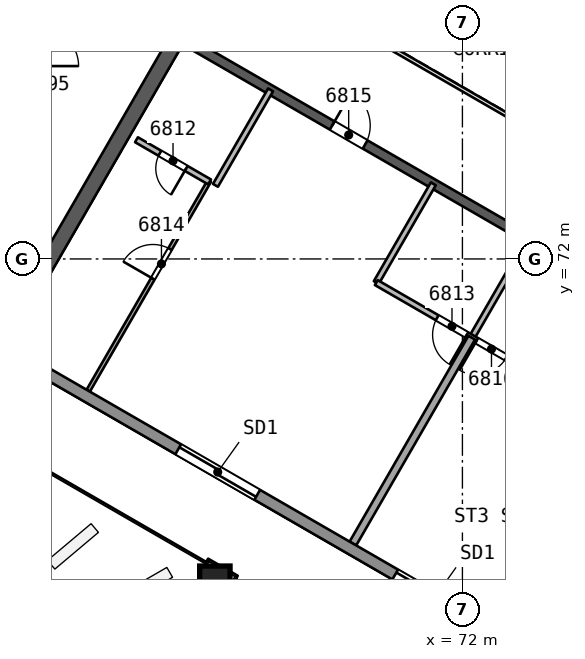
"""IFC4 building model, lengths in metres.
Left out: names, types, materials, properties, quantities, classifications, styles, units other than length and angle.
Written with IfcOpenShell. Run it as: python <this file> out.ifc"""

import sys

from ifc_helpers import new_model, si_unit, direction, frame, frame_2d, origin, origin_2d, place, context, subcontext, project, spatial, rectangle, extrude, element, fill, save


model = new_model("IFC4")
c1 = context("Model", 3, precision=1e-05, world=origin(), true_north=direction((0.0, 1.0)))
c2 = subcontext(c1, "Body", "Model", "MODEL_VIEW")
j1 = project(units=[si_unit("LENGTHUNIT", "METRE"), si_unit("PLANEANGLEUNIT", "RADIAN")], contexts=[c1])
p1 = place(None, origin())
s1 = spatial("IfcSite", under=j1, at=p1, CompositionType="ELEMENT")
p2 = place(p1, origin())
s2 = spatial("IfcBuilding", under=s1, at=p2, CompositionType="ELEMENT")
p3 = place(p2, frame((0.0, 0.0, 277.5)))
s3 = spatial("IfcBuildingStorey", under=s2, at=p3, CompositionType="ELEMENT", Elevation=277.5)
p4 = place(p3, frame((60.737, 71.284, 0.0), z_axis=(0.0, 0.0, 1.0), x_axis=(0.50000547566, 0.866022242388, 0.0)))
e1 = element("IfcWall", 1, at=p4, inside=s3, PredefinedType="SHEAR", context=c2, shape_type="SweptSolid", body=[
    extrude(rectangle(XDim=10.18, YDim=0.4, at=frame_2d((5.09, 0.0))), origin(), (0.0, 0.0, 1.0), 3.7),
])
p5 = place(p4, frame((8.03, 0.0, 0.0)))
e2 = element("IfcOpeningElement", 2, at=p5, cuts=e1, PredefinedType="OPENING", context=c2, shape_type="SweptSolid", body=[
    extrude(rectangle(XDim=1.2, YDim=2.1, at=frame_2d((0.6, 1.05))), frame((0.0, 0.21, 0.0), z_axis=(0.0, -1.0, 0.0), x_axis=(1.0, 0.0, 0.0)), (0.0, 0.0, 1.0), 0.421),
])
p6 = place(p3, frame((64.7, 77.748, 0.0), z_axis=(0.0, 0.0, 1.0), x_axis=(0.866026492143, -0.499998114903, 0.0)))
e3 = element("IfcWall", 3, at=p6, inside=s3, PredefinedType="SHEAR", context=c2, shape_type="SweptSolid", body=[
    extrude(rectangle(XDim=15.588, YDim=0.25, at=frame_2d((7.794, 0.0))), origin(), (0.0, 0.0, 1.0), 3.3),
])
p7 = place(p6, frame((4.473, 0.0, 0.0)))
e4 = element("IfcOpeningElement", 4, at=p7, cuts=e3, PredefinedType="OPENING", context=c2, shape_type="SweptSolid", body=[
    extrude(rectangle(XDim=1.0, YDim=2.1, at=frame_2d((0.5, 1.05))), frame((0.0, 0.135, 0.0), z_axis=(0.0, -1.0, 0.0), x_axis=(1.0, 0.0, 0.0)), (0.0, 0.0, 1.0), 0.271),
])
p8 = place(p6, frame((13.917, 0.0, 0.0)))
e5 = element("IfcOpeningElement", 5, at=p8, cuts=e3, PredefinedType="OPENING", context=c2, shape_type="SweptSolid", body=[
    extrude(rectangle(XDim=1.1, YDim=2.1, at=frame_2d((0.55, 1.05))), frame((0.0, 0.135, 0.0), z_axis=(0.0, -1.0, 0.0), x_axis=(1.0, 0.0, 0.0)), (0.0, 0.0, 1.0), 0.271),
])
p9 = place(p3, frame((65.473, 63.5, 0.0), z_axis=(0.010093620709, 0.017482414954, 0.999796221231), x_axis=(-0.499912926478, -0.865840372083, 0.020187025823)))
e6 = element("IfcColumn", 6, at=p9, inside=s3, PredefinedType="COLUMN", context=c2, shape_type="SweptSolid", body=[
    extrude(rectangle(XDim=0.8, YDim=0.8, at=origin_2d()), origin(), (0.0, 0.0, 1.0), 3.701),
])
p10 = place(p3, frame((62.154, 68.534, 0.0), z_axis=(0.0, 0.0, 1.0), x_axis=(0.499987773676, 0.866032462541, 0.0)))
e7 = element("IfcWall", 7, at=p10, inside=s3, PredefinedType="PARTITIONING", context=c2, shape_type="SweptSolid", body=[
    extrude(rectangle(XDim=6.372, YDim=0.1, at=frame_2d((3.186, 0.0))), origin(), (0.0, 0.0, 1.0), 3.3),
])
p11 = place(p10, frame((3.403, 0.0, 0.0)))
e8 = element("IfcOpeningElement", 8, at=p11, cuts=e7, PredefinedType="OPENING", context=c2, shape_type="SweptSolid", body=[
    extrude(rectangle(XDim=0.9, YDim=2.1, at=frame_2d((0.45, 1.05))), frame((0.0, 0.061, 0.0), z_axis=(0.0, -1.0, 0.0), x_axis=(1.0, 0.0, 0.0)), (0.0, 0.0, 1.0), 0.121),
])
p12 = place(p3, frame((65.347, 74.026, 0.0), z_axis=(0.0, 0.0, 1.0), x_axis=(-0.866042797968, 0.49996987118, 0.0)))
e9 = element("IfcWall", 9, at=p12, inside=s3, PredefinedType="PARTITIONING", context=c2, shape_type="SweptSolid", body=[
    extrude(rectangle(XDim=2.221, YDim=0.15, at=frame_2d((1.11, 0.0))), origin(), (0.0, 0.0, 1.0), 3.3),
])
p13 = place(p12, frame((0.711, 0.0, 0.0)))
e10 = element("IfcOpeningElement", 10, at=p13, cuts=e9, PredefinedType="OPENING", context=c2, shape_type="SweptSolid", body=[
    extrude(rectangle(XDim=0.8, YDim=2.1, at=frame_2d((0.4, 1.05))), frame((0.0, 0.085, 0.0), z_axis=(0.0, -1.0, 0.0), x_axis=(1.0, 0.0, 0.0)), (0.0, 0.0, 1.0), 0.171),
])
p14 = place(p3, frame((66.952, 76.448, 0.0), z_axis=(0.0, 0.0, 1.0), x_axis=(-0.499987231761, -0.866032775405, 0.0)))
e11 = element("IfcWall", 11, at=p14, inside=s3, PredefinedType="PARTITIONING", context=c2, shape_type="SweptSolid", body=[
    extrude(rectangle(XDim=2.9, YDim=0.15, at=frame_2d((1.45, 0.0))), origin(), (0.0, 0.0, 1.0), 3.3),
])
p15 = place(p3, frame((73.745, 72.526, 0.0), z_axis=(0.0, 0.0, 1.0), x_axis=(-0.50002537861, -0.866010750942, 0.0)))
e12 = element("IfcWall", 12, at=p15, inside=s3, PredefinedType="PARTITIONING", context=c2, shape_type="SweptSolid", body=[
    extrude(rectangle(XDim=3.0, YDim=0.15, at=frame_2d((1.5, 0.0))), origin(), (0.0, 0.0, 1.0), 3.3),
])
p16 = place(p3, frame((69.734, 71.378, 0.0), z_axis=(0.0, 0.0, 1.0), x_axis=(0.499990139034, 0.866031096941, 0.0)))
e13 = element("IfcWall", 13, at=p16, inside=s3, PredefinedType="PARTITIONING", context=c2, shape_type="SweptSolid", body=[
    extrude(rectangle(XDim=3.0, YDim=0.15, at=frame_2d((1.5, 0.0))), origin(), (0.0, 0.0, 1.0), 3.3),
])
p17 = place(p3, frame((69.118, 64.512, 0.0), z_axis=(0.0, 0.0, 1.0), x_axis=(0.499997275202, 0.866026976941, 0.0)))
e14 = element("IfcWall", 14, at=p17, inside=s3, PredefinedType="PARTITIONING", context=c2, shape_type="SweptSolid", body=[
    extrude(rectangle(XDim=6.254, YDim=0.2, at=frame_2d((3.127, 0.0))), origin(), (0.0, 0.0, 1.0), 3.3),
])
p18 = place(p3, frame((74.757, 68.478, 0.0), z_axis=(0.0, 0.0, 1.0), x_axis=(-0.86601454848, 0.500018801468, 0.0)))
e15 = element("IfcWall", 15, at=p18, inside=s3, PredefinedType="PARTITIONING", context=c2, shape_type="SweptSolid", body=[
    extrude(rectangle(XDim=5.8, YDim=0.15, at=frame_2d((2.9, 0.0))), origin(), (0.0, 0.0, 1.0), 3.3),
])
p19 = place(p18, frame((3.05, 0.0, 0.0)))
e16 = element("IfcOpeningElement", 16, at=p19, cuts=e15, PredefinedType="OPENING", context=c2, shape_type="SweptSolid", body=[
    extrude(rectangle(XDim=0.9, YDim=2.1, at=frame_2d((0.45, 1.05))), frame((0.0, 0.085, 0.0), z_axis=(0.0, -1.0, 0.0), x_axis=(1.0, 0.0, 0.0)), (0.0, 0.0, 1.0), 0.171),
])
p20 = place(p18, frame((1.85, 0.0, 0.0)))
e17 = element("IfcOpeningElement", 17, at=p20, cuts=e15, PredefinedType="OPENING", context=c2, shape_type="SweptSolid", body=[
    extrude(rectangle(XDim=0.9, YDim=2.1, at=frame_2d((0.45, 1.05))), frame((0.0, 0.085, 0.0), z_axis=(0.0, -1.0, 0.0), x_axis=(1.0, 0.0, 0.0)), (0.0, 0.0, 1.0), 0.171),
])
p21 = place(p3, frame((87.299, 53.843, 0.0), z_axis=(0.0, 0.0, 1.0), x_axis=(-0.866024279277, 0.500001947699, 0.0)))
e18 = element("IfcWall", 18, at=p21, inside=s3, PredefinedType="SOLIDWALL", context=c2, shape_type="SweptSolid", body=[
    extrude(rectangle(XDim=47.46, YDim=0.3, at=frame_2d((23.73, 0.0))), origin(), (0.0, 0.0, 1.0), 3.3),
])
p22 = place(p21, frame((17.308, 0.0, 0.0)))
e19 = element("IfcOpeningElement", 19, at=p22, cuts=e18, PredefinedType="OPENING", context=c2, shape_type="SweptSolid", body=[
    extrude(rectangle(XDim=2.4, YDim=2.4, at=frame_2d((1.2, 1.2))), frame((0.0, 0.161, 0.0), z_axis=(0.0, -1.0, 0.0), x_axis=(1.0, 0.0, 0.0)), (0.0, 0.0, 1.0), 0.321),
])
p23 = place(p21, frame((37.135, 0.0, 0.0)))
e20 = element("IfcOpeningElement", 20, at=p23, cuts=e18, PredefinedType="OPENING", context=c2, shape_type="SweptSolid", body=[
    extrude(rectangle(XDim=2.4, YDim=2.4, at=frame_2d((1.2, 1.2))), frame((0.0, 0.161, 0.0), z_axis=(0.0, -1.0, 0.0), x_axis=(1.0, 0.0, 0.0)), (0.0, 0.0, 1.0), 0.321),
])
p24 = place(p21, frame((23.901, 0.0, 0.0)))
e21 = element("IfcOpeningElement", 21, at=p24, cuts=e18, PredefinedType="OPENING", context=c2, shape_type="SweptSolid", body=[
    extrude(rectangle(XDim=2.4, YDim=2.4, at=frame_2d((1.2, 1.2))), frame((0.0, 0.161, 0.0), z_axis=(0.0, -1.0, 0.0), x_axis=(1.0, 0.0, 0.0)), (0.0, 0.0, 1.0), 0.321),
])
p25 = place(p3, frame((67.702, 78.948, 0.0), z_axis=(0.0, 0.0, 1.0), x_axis=(0.866026658274, -0.499997827154, 0.0)))
e22 = element("IfcWall", 22, at=p25, inside=s3, PredefinedType="PARTITIONING", context=c2, shape_type="SweptSolid", body=[
    extrude(rectangle(XDim=11.588, YDim=0.1, at=frame_2d((5.794, 0.0))), origin(), (0.0, 0.0, 1.0), 3.3),
])
p26 = place(p13, origin())
e23 = element("IfcDoor", 23, at=p26, inside=s3, OperationType="SINGLE_SWING_LEFT", PredefinedType="NOTDEFINED", context=c2, shape_type="SweptSolid", body=[
    extrude(rectangle(XDim=0.8, YDim=2.1, at=frame_2d((0.4, 1.05))), frame((0.0, 0.025, 0.0), z_axis=(0.0, -1.0, 0.0), x_axis=(1.0, 0.0, 0.0)), (0.0, 0.0, 1.0), 0.05),
])
fill(e10, e23)
p27 = place(p19, origin())
e24 = element("IfcDoor", 24, at=p27, inside=s3, OperationType="SINGLE_SWING_LEFT", PredefinedType="NOTDEFINED", context=c2, shape_type="SweptSolid", body=[
    extrude(rectangle(XDim=0.9, YDim=2.1, at=frame_2d((0.45, 1.05))), frame((0.0, 0.025, 0.0), z_axis=(0.0, -1.0, 0.0), x_axis=(1.0, 0.0, 0.0)), (0.0, 0.0, 1.0), 0.05),
])
fill(e16, e24)
p28 = place(p11, origin())
e25 = element("IfcDoor", 25, at=p28, inside=s3, OperationType="SINGLE_SWING_LEFT", PredefinedType="NOTDEFINED", context=c2, shape_type="SweptSolid", body=[
    extrude(rectangle(XDim=0.9, YDim=2.1, at=frame_2d((0.45, 1.05))), frame((0.0, 0.025, 0.0), z_axis=(0.0, -1.0, 0.0), x_axis=(1.0, 0.0, 0.0)), (0.0, 0.0, 1.0), 0.05),
])
fill(e8, e25)
p29 = place(p7, origin())
e26 = element("IfcDoor", 26, at=p29, inside=s3, OperationType="SINGLE_SWING_LEFT", PredefinedType="NOTDEFINED", context=c2, shape_type="SweptSolid", body=[
    extrude(rectangle(XDim=1.0, YDim=2.1, at=frame_2d((0.5, 1.05))), frame((0.0, 0.025, 0.0), z_axis=(0.0, -1.0, 0.0), x_axis=(1.0, 0.0, 0.0)), (0.0, 0.0, 1.0), 0.05),
])
fill(e4, e26)
p30 = place(p20, origin())
e27 = element("IfcDoor", 27, at=p30, inside=s3, OperationType="SINGLE_SWING_RIGHT", PredefinedType="NOTDEFINED", context=c2, shape_type="SweptSolid", body=[
    extrude(rectangle(XDim=0.9, YDim=2.1, at=frame_2d((0.45, 1.05))), frame((0.0, 0.025, 0.0), z_axis=(0.0, -1.0, 0.0), x_axis=(1.0, 0.0, 0.0)), (0.0, 0.0, 1.0), 0.05),
])
fill(e17, e27)
p31 = place(p22, origin())
e28 = element("IfcDoor", 28, at=p31, inside=s3, OperationType="SLIDING_TO_LEFT", PredefinedType="NOTDEFINED", context=c2, shape_type="SweptSolid", body=[
    extrude(rectangle(XDim=2.4, YDim=2.4, at=frame_2d((1.2, 1.2))), frame((0.0, 0.025, 0.0), z_axis=(0.0, -1.0, 0.0), x_axis=(1.0, 0.0, 0.0)), (0.0, 0.0, 1.0), 0.05),
])
fill(e19, e28)
p32 = place(p24, origin())
e29 = element("IfcDoor", 29, at=p32, inside=s3, OperationType="SLIDING_TO_LEFT", PredefinedType="NOTDEFINED", context=c2, shape_type="SweptSolid", body=[
    extrude(rectangle(XDim=2.4, YDim=2.4, at=frame_2d((1.2, 1.2))), frame((0.0, 0.025, 0.0), z_axis=(0.0, -1.0, 0.0), x_axis=(1.0, 0.0, 0.0)), (0.0, 0.0, 1.0), 0.05),
])
fill(e21, e29)
save(model, sys.argv[1])
